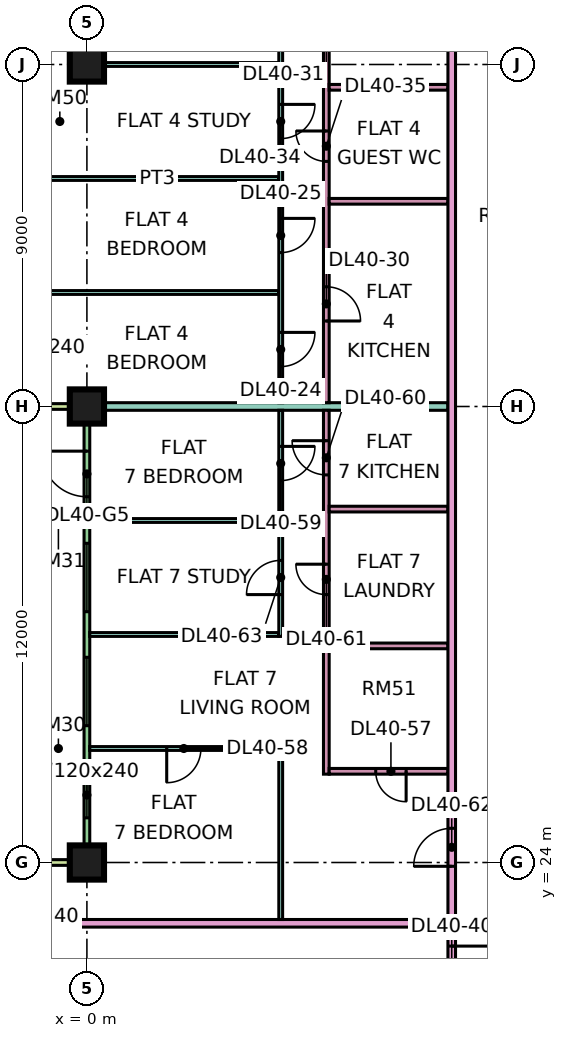
"""IFC4 building model, lengths in metres.
Left out: names, types, materials, properties, quantities, classifications, styles, units other than length and angle.
Written with IfcOpenShell. Run it as: python <this file> out.ifc"""

import sys

from ifc_helpers import new_model, si_unit, direction, frame, frame_2d, origin, origin_2d, place, context, subcontext, project, spatial, rectangle, extrude, element, fill, save


model = new_model("IFC4")
c1 = context("Model", 3, precision=1e-05, world=origin(), true_north=direction((0.0, 1.0)))
c2 = subcontext(c1, "Body", "Model", "MODEL_VIEW")
j1 = project(units=[si_unit("LENGTHUNIT", "METRE"), si_unit("PLANEANGLEUNIT", "RADIAN")], contexts=[c1])
p1 = place(None, origin())
s1 = spatial("IfcSite", under=j1, at=p1, CompositionType="ELEMENT")
p2 = place(p1, origin())
s2 = spatial("IfcBuilding", under=s1, at=p2, CompositionType="ELEMENT")
p3 = place(p2, frame((0.0, 0.0, 176.15)))
s3 = spatial("IfcBuildingStorey", under=s2, at=p3, CompositionType="ELEMENT", Elevation=176.15)
p4 = place(p3, frame((0.0, 24.0, 0.0), z_axis=(0.0, 0.0, 1.0), x_axis=(1.0, 0.0, 0.0)))
e1 = element("IfcColumn", 1, at=p4, inside=s3, PredefinedType="COLUMN", context=c2, shape_type="SweptSolid", body=[
    extrude(rectangle(XDim=0.9, YDim=0.9, at=origin_2d()), origin(), (0.0, 0.0, 1.0), 3.75),
])
p5 = place(p3, frame((0.0, 36.0, 0.0), z_axis=(0.0, 0.0, 1.0), x_axis=(1.0, 0.0, 0.0)))
e2 = element("IfcColumn", 2, at=p5, inside=s3, PredefinedType="COLUMN", context=c2, shape_type="SweptSolid", body=[
    extrude(rectangle(XDim=0.9, YDim=0.9, at=origin_2d()), origin(), (0.0, 0.0, 1.0), 3.75),
])
p6 = place(p3, frame((0.0, 45.0, 0.0), z_axis=(0.0, 0.0, 1.0), x_axis=(1.0, 0.0, 0.0)))
e3 = element("IfcColumn", 3, at=p6, inside=s3, PredefinedType="COLUMN", context=c2, shape_type="SweptSolid", body=[
    extrude(rectangle(XDim=0.9, YDim=0.9, at=origin_2d()), origin(), (0.0, 0.0, 1.0), 3.75),
])
p7 = place(p3, frame((0.0, 35.925, 0.0), z_axis=(0.0, 0.0, 1.0), x_axis=(0.0, -1.0, 0.0)))
e4 = element("IfcWall", 4, at=p7, inside=s3, PredefinedType="SOLIDWALL", context=c2, shape_type="SweptSolid", body=[
    extrude(rectangle(XDim=11.85, YDim=0.15, at=frame_2d((5.925, 0.0))), origin(), (0.0, 0.0, 1.0), 3.35),
])
p8 = place(p7, frame((1.1, 0.0, 0.0)))
e5 = element("IfcOpeningElement", 5, at=p8, cuts=e4, PredefinedType="OPENING", context=c2, shape_type="SweptSolid", body=[
    extrude(rectangle(XDim=1.2, YDim=2.4, at=frame_2d((0.6, 1.2))), frame((0.0, 0.085, 0.0), z_axis=(0.0, -1.0, 0.0), x_axis=(1.0, 0.0, 0.0)), (0.0, 0.0, 1.0), 0.17),
])
p9 = place(p7, frame((3.525, 0.0, 0.45)))
e6 = element("IfcOpeningElement", 6, at=p9, cuts=e4, PredefinedType="OPENING", context=c2, shape_type="SweptSolid", body=[
    extrude(rectangle(XDim=1.8, YDim=2.4, at=frame_2d((0.9, 1.2))), frame((0.0, 0.085, 0.0), z_axis=(0.0, -1.0, 0.0), x_axis=(1.0, 0.0, 0.0)), (0.0, 0.0, 1.0), 0.17),
])
p10 = place(p7, frame((6.525, 0.0, 0.45)))
e7 = element("IfcOpeningElement", 7, at=p10, cuts=e4, PredefinedType="OPENING", context=c2, shape_type="SweptSolid", body=[
    extrude(rectangle(XDim=1.8, YDim=2.4, at=frame_2d((0.9, 1.2))), frame((0.0, 0.085, 0.0), z_axis=(0.0, -1.0, 0.0), x_axis=(1.0, 0.0, 0.0)), (0.0, 0.0, 1.0), 0.17),
])
p11 = place(p7, frame((9.55, 0.0, 0.45)))
e8 = element("IfcOpeningElement", 8, at=p11, cuts=e4, PredefinedType="OPENING", context=c2, shape_type="SweptSolid", body=[
    extrude(rectangle(XDim=1.2, YDim=2.4, at=frame_2d((0.6, 1.2))), frame((0.0, 0.085, 0.0), z_axis=(0.0, -1.0, 0.0), x_axis=(1.0, 0.0, 0.0)), (0.0, 0.0, 1.0), 0.17),
])
for number, where, z_axis, x_axis in (
    (9, (-1.5, 36.0, 0.0), (0.0, 0.0, 1.0), (1.0, 0.0, 0.0)),
    (10, (-1.5, 24.0, 0.0), (0.0, 0.0, 1.0), (1.0, 0.0, 0.0)),
):
    element("IfcWall", number, at=place(p3, frame(where, z_axis=z_axis, x_axis=x_axis)), inside=s3, PredefinedType="SOLIDWALL", context=c2, shape_type="SweptSolid", body=[
        extrude(rectangle(XDim=1.5, YDim=0.15, at=frame_2d((0.75, 0.0))), origin(), (0.0, 0.0, 1.0), 3.35),
    ])
p12 = place(p3, frame((-1.351, 39.0, 0.0), z_axis=(0.0, 0.0, 1.0), x_axis=(1.0, 0.0, 0.0)))
e11 = element("IfcWall", 11, at=p12, inside=s3, PredefinedType="PARTITIONING", context=c2, shape_type="SweptSolid", body=[
    extrude(rectangle(XDim=6.401, YDim=0.1, at=frame_2d((3.201, 0.0))), origin(), (0.0, 0.0, 1.0), 3.35),
])
p13 = place(p3, frame((-1.35, 22.4, 0.0), z_axis=(0.0, 0.0, 1.0), x_axis=(1.0, 0.0, 0.0)))
e12 = element("IfcWall", 12, at=p13, inside=s3, PredefinedType="PARTITIONING", context=c2, shape_type="SweptSolid", body=[
    extrude(rectangle(XDim=10.85, YDim=0.2, at=frame_2d((5.425, 0.0))), origin(), (0.0, 0.0, 1.0), 3.35),
])
e13 = element("IfcWall", 13, at=p5, inside=s3, PredefinedType="PARTITIONING", context=c2, shape_type="SweptSolid", body=[
    extrude(rectangle(XDim=9.5, YDim=0.2, at=frame_2d((4.75, 0.0))), origin(), (0.0, 0.0, 1.0), 3.35),
])
p14 = place(p3, frame((-1.35, 42.0, 0.0), z_axis=(0.0, 0.0, 1.0), x_axis=(1.0, 0.0, 0.0)))
e14 = element("IfcWall", 14, at=p14, inside=s3, PredefinedType="PARTITIONING", context=c2, shape_type="SweptSolid", body=[
    extrude(rectangle(XDim=6.4, YDim=0.1, at=frame_2d((3.2, 0.0))), origin(), (0.0, 0.0, 1.0), 3.35),
])
e15 = element("IfcWall", 15, at=p6, inside=s3, PredefinedType="PARTITIONING", context=c2, shape_type="SweptSolid", body=[
    extrude(rectangle(XDim=5.05, YDim=0.1, at=frame_2d((2.525, 0.0))), origin(), (0.0, 0.0, 1.0), 3.35),
])
p15 = place(p3, frame((0.074, 27.0, 0.0), z_axis=(0.0, 0.0, 1.0), x_axis=(1.0, 0.0, 0.0)))
e16 = element("IfcWall", 16, at=p15, inside=s3, PredefinedType="PARTITIONING", context=c2, shape_type="SweptSolid", body=[
    extrude(rectangle(XDim=5.076, YDim=0.1, at=frame_2d((2.538, 0.0))), origin(), (0.0, 0.0, 1.0), 3.35),
])
p16 = place(p15, frame((2.026, 0.0, 0.0)))
e17 = element("IfcOpeningElement", 17, at=p16, cuts=e16, PredefinedType="OPENING", context=c2, shape_type="SweptSolid", body=[
    extrude(rectangle(XDim=0.9, YDim=2.1, at=frame_2d((0.45, 1.05))), frame((0.0, 0.06, 0.0), z_axis=(0.0, -1.0, 0.0), x_axis=(1.0, 0.0, 0.0)), (0.0, 0.0, 1.0), 0.12),
])
for number, where, z_axis, x_axis in (
    (18, (0.074, 30.0, 0.0), (0.0, 0.0, 1.0), (1.0, 0.0, 0.0)),
    (19, (0.074, 33.0, 0.0), (0.0, 0.0, 1.0), (1.0, 0.0, 0.0)),
):
    element("IfcWall", number, at=place(p3, frame(where, z_axis=z_axis, x_axis=x_axis)), inside=s3, PredefinedType="PARTITIONING", context=c2, shape_type="SweptSolid", body=[
        extrude(rectangle(XDim=4.976, YDim=0.1, at=frame_2d((2.488, 0.0))), origin(), (0.0, 0.0, 1.0), 3.35),
    ])
p17 = place(p3, frame((5.1, 22.5, 0.0), z_axis=(0.0, 0.0, 1.0), x_axis=(0.0, 1.0, 0.0)))
e20 = element("IfcWall", 20, at=p17, inside=s3, PredefinedType="PARTITIONING", context=c2, shape_type="SweptSolid", body=[
    extrude(rectangle(XDim=4.45, YDim=0.1, at=frame_2d((2.225, 0.0))), origin(), (0.0, 0.0, 1.0), 3.35),
])
p18 = place(p3, frame((5.1, 29.95, 0.0), z_axis=(0.0, 0.0, 1.0), x_axis=(0.0, 1.0, 0.0)))
e21 = element("IfcWall", 21, at=p18, inside=s3, PredefinedType="PARTITIONING", context=c2, shape_type="SweptSolid", body=[
    extrude(rectangle(XDim=5.95, YDim=0.1, at=frame_2d((2.975, 0.0))), origin(), (0.0, 0.0, 1.0), 3.35),
])
p19 = place(p18, frame((4.1, 0.0, 0.0)))
e22 = element("IfcOpeningElement", 22, at=p19, cuts=e21, PredefinedType="OPENING", context=c2, shape_type="SweptSolid", body=[
    extrude(rectangle(XDim=0.9, YDim=2.1, at=frame_2d((0.45, 1.05))), frame((0.0, 0.06, 0.0), z_axis=(0.0, -1.0, 0.0), x_axis=(1.0, 0.0, 0.0)), (0.0, 0.0, 1.0), 0.12),
])
p20 = place(p18, frame((1.1, 0.0, 0.0)))
e23 = element("IfcOpeningElement", 23, at=p20, cuts=e21, PredefinedType="OPENING", context=c2, shape_type="SweptSolid", body=[
    extrude(rectangle(XDim=0.9, YDim=2.1, at=frame_2d((0.45, 1.05))), frame((0.0, 0.06, 0.0), z_axis=(0.0, -1.0, 0.0), x_axis=(1.0, 0.0, 0.0)), (0.0, 0.0, 1.0), 0.12),
])
p21 = place(p3, frame((5.1, 36.1, 0.0), z_axis=(0.0, 0.0, 1.0), x_axis=(0.0, 1.0, 0.0)))
e24 = element("IfcWall", 24, at=p21, inside=s3, PredefinedType="PARTITIONING", context=c2, shape_type="SweptSolid", body=[
    extrude(rectangle(XDim=26.826, YDim=0.1, at=frame_2d((13.413, 0.0))), origin(), (0.0, 0.0, 1.0), 3.35),
])
p22 = place(p21, frame((0.95, 0.0, 0.0)))
e25 = element("IfcOpeningElement", 25, at=p22, cuts=e24, PredefinedType="OPENING", context=c2, shape_type="SweptSolid", body=[
    extrude(rectangle(XDim=0.9, YDim=2.1, at=frame_2d((0.45, 1.05))), frame((0.0, 0.06, 0.0), z_axis=(0.0, -1.0, 0.0), x_axis=(1.0, 0.0, 0.0)), (0.0, 0.0, 1.0), 0.12),
])
p23 = place(p21, frame((3.95, 0.0, 0.0)))
e26 = element("IfcOpeningElement", 26, at=p23, cuts=e24, PredefinedType="OPENING", context=c2, shape_type="SweptSolid", body=[
    extrude(rectangle(XDim=0.9, YDim=2.1, at=frame_2d((0.45, 1.05))), frame((0.0, 0.06, 0.0), z_axis=(0.0, -1.0, 0.0), x_axis=(1.0, 0.0, 0.0)), (0.0, 0.0, 1.0), 0.12),
])
p24 = place(p21, frame((9.95, 0.0, 0.0)))
e27 = element("IfcOpeningElement", 27, at=p24, cuts=e24, PredefinedType="OPENING", context=c2, shape_type="SweptSolid", body=[
    extrude(rectangle(XDim=0.9, YDim=2.1, at=frame_2d((0.45, 1.05))), frame((0.0, 0.06, 0.0), z_axis=(0.0, -1.0, 0.0), x_axis=(1.0, 0.0, 0.0)), (0.0, 0.0, 1.0), 0.12),
])
p25 = place(p21, frame((21.95, 0.0, 0.0)))
e28 = element("IfcOpeningElement", 28, at=p25, cuts=e24, PredefinedType="OPENING", context=c2, shape_type="SweptSolid", body=[
    extrude(rectangle(XDim=0.9, YDim=2.1, at=frame_2d((0.45, 1.05))), frame((0.0, 0.06, 0.0), z_axis=(0.0, -1.0, 0.0), x_axis=(1.0, 0.0, 0.0)), (0.0, 0.0, 1.0), 0.12),
])
p26 = place(p21, frame((24.95, 0.0, 0.0)))
e29 = element("IfcOpeningElement", 29, at=p26, cuts=e24, PredefinedType="OPENING", context=c2, shape_type="SweptSolid", body=[
    extrude(rectangle(XDim=0.9, YDim=2.1, at=frame_2d((0.45, 1.05))), frame((0.0, 0.06, 0.0), z_axis=(0.0, -1.0, 0.0), x_axis=(1.0, 0.0, 0.0)), (0.0, 0.0, 1.0), 0.12),
])
p27 = place(p21, frame((15.95, 0.0, 0.0)))
e30 = element("IfcOpeningElement", 30, at=p27, cuts=e24, PredefinedType="OPENING", context=c2, shape_type="SweptSolid", body=[
    extrude(rectangle(XDim=0.9, YDim=2.1, at=frame_2d((0.45, 1.05))), frame((0.0, 0.06, 0.0), z_axis=(0.0, -1.0, 0.0), x_axis=(1.0, 0.0, 0.0)), (0.0, 0.0, 1.0), 0.12),
])
p28 = place(p21, frame((6.95, 0.0, 0.0)))
e31 = element("IfcOpeningElement", 31, at=p28, cuts=e24, PredefinedType="OPENING", context=c2, shape_type="SweptSolid", body=[
    extrude(rectangle(XDim=0.9, YDim=2.1, at=frame_2d((0.45, 1.05))), frame((0.0, 0.06, 0.0), z_axis=(0.0, -1.0, 0.0), x_axis=(1.0, 0.0, 0.0)), (0.0, 0.0, 1.0), 0.12),
])
p29 = place(p3, frame((6.3, 26.325, 0.0), z_axis=(0.0, 0.0, 1.0), x_axis=(0.0, 1.0, 0.0)))
e32 = element("IfcWall", 32, at=p29, inside=s3, PredefinedType="PARTITIONING", context=c2, shape_type="SweptSolid", body=[
    extrude(rectangle(XDim=9.575, YDim=0.15, at=frame_2d((4.788, 0.0))), origin(), (0.0, 0.0, 1.0), 3.35),
])
p30 = place(p29, frame((7.875, 0.0, 0.0)))
e33 = element("IfcOpeningElement", 33, at=p30, cuts=e32, PredefinedType="OPENING", context=c2, shape_type="SweptSolid", body=[
    extrude(rectangle(XDim=0.9, YDim=2.1, at=frame_2d((0.45, 1.05))), frame((0.0, 0.085, 0.0), z_axis=(0.0, -1.0, 0.0), x_axis=(1.0, 0.0, 0.0)), (0.0, 0.0, 1.0), 0.17),
])
p31 = place(p29, frame((4.725, 0.0, 0.0)))
e34 = element("IfcOpeningElement", 34, at=p31, cuts=e32, PredefinedType="OPENING", context=c2, shape_type="SweptSolid", body=[
    extrude(rectangle(XDim=0.8, YDim=2.1, at=frame_2d((0.4, 1.05))), frame((0.0, 0.085, 0.0), z_axis=(0.0, -1.0, 0.0), x_axis=(1.0, 0.0, 0.0)), (0.0, 0.0, 1.0), 0.17),
])
p32 = place(p3, frame((6.3, 36.1, 0.0), z_axis=(0.0, 0.0, 1.0), x_axis=(0.0, 1.0, 0.0)))
e35 = element("IfcWall", 35, at=p32, inside=s3, PredefinedType="PARTITIONING", context=c2, shape_type="SweptSolid", body=[
    extrude(rectangle(XDim=14.375, YDim=0.15, at=frame_2d((7.188, 0.0))), origin(), (0.0, 0.0, 1.0), 3.35),
])
p33 = place(p32, frame((2.15, 0.0, 0.0)))
e36 = element("IfcOpeningElement", 36, at=p33, cuts=e35, PredefinedType="OPENING", context=c2, shape_type="SweptSolid", body=[
    extrude(rectangle(XDim=0.9, YDim=2.1, at=frame_2d((0.45, 1.05))), frame((0.0, 0.085, 0.0), z_axis=(0.0, -1.0, 0.0), x_axis=(1.0, 0.0, 0.0)), (0.0, 0.0, 1.0), 0.17),
])
p34 = place(p32, frame((9.35, 0.0, 0.0)))
e37 = element("IfcOpeningElement", 37, at=p34, cuts=e35, PredefinedType="OPENING", context=c2, shape_type="SweptSolid", body=[
    extrude(rectangle(XDim=0.8, YDim=2.1, at=frame_2d((0.4, 1.05))), frame((0.0, 0.085, 0.0), z_axis=(0.0, -1.0, 0.0), x_axis=(1.0, 0.0, 0.0)), (0.0, 0.0, 1.0), 0.17),
])
p35 = place(p32, frame((6.35, 0.0, 0.0)))
e38 = element("IfcOpeningElement", 38, at=p35, cuts=e35, PredefinedType="OPENING", context=c2, shape_type="SweptSolid", body=[
    extrude(rectangle(XDim=0.8, YDim=2.1, at=frame_2d((0.4, 1.05))), frame((0.0, 0.085, 0.0), z_axis=(0.0, -1.0, 0.0), x_axis=(1.0, 0.0, 0.0)), (0.0, 0.0, 1.0), 0.17),
])
p36 = place(p32, frame((12.35, 0.0, 0.0)))
e39 = element("IfcOpeningElement", 39, at=p36, cuts=e35, PredefinedType="OPENING", context=c2, shape_type="SweptSolid", body=[
    extrude(rectangle(XDim=0.8, YDim=2.1, at=frame_2d((0.4, 1.05))), frame((0.0, 0.085, 0.0), z_axis=(0.0, -1.0, 0.0), x_axis=(1.0, 0.0, 0.0)), (0.0, 0.0, 1.0), 0.17),
])
p37 = place(p3, frame((6.375, 26.4, 0.0), z_axis=(0.0, 0.0, 1.0), x_axis=(1.0, 0.0, 0.0)))
e40 = element("IfcWall", 40, at=p37, inside=s3, PredefinedType="PARTITIONING", context=c2, shape_type="SweptSolid", body=[
    extrude(rectangle(XDim=3.125, YDim=0.15, at=frame_2d((1.562, 0.0))), origin(), (0.0, 0.0, 1.0), 3.35),
])
p38 = place(p37, frame((1.225, 0.0, 0.0)))
e41 = element("IfcOpeningElement", 41, at=p38, cuts=e40, PredefinedType="OPENING", context=c2, shape_type="SweptSolid", body=[
    extrude(rectangle(XDim=0.8, YDim=2.1, at=frame_2d((0.4, 1.05))), frame((0.0, 0.085, 0.0), z_axis=(0.0, -1.0, 0.0), x_axis=(1.0, 0.0, 0.0)), (0.0, 0.0, 1.0), 0.17),
])
for number, where, z_axis, x_axis in (
    (42, (6.375, 29.7, 0.0), (0.0, 0.0, 1.0), (1.0, 0.0, 0.0)),
    (43, (6.375, 33.3, 0.0), (0.0, 0.0, 1.0), (1.0, 0.0, 0.0)),
    (44, (6.375, 41.4, 0.0), (0.0, 0.0, 1.0), (1.0, 0.0, 0.0)),
    (45, (6.375, 44.4, 0.0), (0.0, 0.0, 1.0), (1.0, 0.0, 0.0)),
):
    element("IfcWall", number, at=place(p3, frame(where, z_axis=z_axis, x_axis=x_axis)), inside=s3, PredefinedType="PARTITIONING", context=c2, shape_type="SweptSolid", body=[
        extrude(rectangle(XDim=3.125, YDim=0.15, at=frame_2d((1.562, 0.0))), origin(), (0.0, 0.0, 1.0), 3.35),
    ])
p39 = place(p3, frame((9.6, 20.0, 0.0), z_axis=(0.0, 0.0, 1.0), x_axis=(0.0, 1.0, 0.0)))
e46 = element("IfcWall", 46, at=p39, inside=s3, PredefinedType="PARTITIONING", context=c2, shape_type="SweptSolid", body=[
    extrude(rectangle(XDim=42.926, YDim=0.2, at=frame_2d((21.463, 0.0))), origin(), (0.0, 0.0, 1.0), 3.35),
])
p40 = place(p39, frame((31.35, 0.0, 0.0)))
e47 = element("IfcOpeningElement", 47, at=p40, cuts=e46, PredefinedType="OPENING", context=c2, shape_type="SweptSolid", body=[
    extrude(rectangle(XDim=1.0, YDim=2.1, at=frame_2d((0.5, 1.05))), frame((0.0, 0.11, 0.0), z_axis=(0.0, -1.0, 0.0), x_axis=(1.0, 0.0, 0.0)), (0.0, 0.0, 1.0), 0.22),
])
p41 = place(p39, frame((0.6, 0.0, 0.0)))
e48 = element("IfcOpeningElement", 48, at=p41, cuts=e46, PredefinedType="OPENING", context=c2, shape_type="SweptSolid", body=[
    extrude(rectangle(XDim=1.2, YDim=2.1, at=frame_2d((0.6, 1.05))), frame((0.0, 0.11, 0.0), z_axis=(0.0, -1.0, 0.0), x_axis=(1.0, 0.0, 0.0)), (0.0, 0.0, 1.0), 0.22),
])
p42 = place(p39, frame((3.9, 0.0, 0.0)))
e49 = element("IfcOpeningElement", 49, at=p42, cuts=e46, PredefinedType="OPENING", context=c2, shape_type="SweptSolid", body=[
    extrude(rectangle(XDim=1.0, YDim=2.1, at=frame_2d((0.5, 1.05))), frame((0.0, 0.11, 0.0), z_axis=(0.0, -1.0, 0.0), x_axis=(1.0, 0.0, 0.0)), (0.0, 0.0, 1.0), 0.22),
])
p43 = place(p8, frame((1.2, 0.0, 0.0), z_axis=(0.0, 0.0, 1.0), x_axis=(-1.0, 0.0, 0.0)))
e50 = element("IfcDoor", 50, at=p43, inside=s3, OperationType="DOUBLE_DOOR_SINGLE_SWING", PredefinedType="DOOR", context=c2, shape_type="SweptSolid", body=[
    extrude(rectangle(XDim=1.2, YDim=2.4, at=frame_2d((0.6, 1.2))), frame((0.0, 0.025, 0.0), z_axis=(0.0, -1.0, 0.0), x_axis=(1.0, 0.0, 0.0)), (0.0, 0.0, 1.0), 0.05),
])
fill(e5, e50)
p44 = place(p9, origin())
e51 = element("IfcWindow", 51, at=p44, inside=s3, PartitioningType="SINGLE_PANEL", PredefinedType="WINDOW", context=c2, shape_type="SweptSolid", body=[
    extrude(rectangle(XDim=1.8, YDim=2.4, at=frame_2d((0.9, 1.2))), frame((0.0, 0.03, 0.0), z_axis=(0.0, -1.0, 0.0), x_axis=(1.0, 0.0, 0.0)), (0.0, 0.0, 1.0), 0.06),
])
fill(e6, e51)
p45 = place(p10, origin())
e52 = element("IfcWindow", 52, at=p45, inside=s3, PartitioningType="SINGLE_PANEL", PredefinedType="WINDOW", context=c2, shape_type="SweptSolid", body=[
    extrude(rectangle(XDim=1.8, YDim=2.4, at=frame_2d((0.9, 1.2))), frame((0.0, 0.03, 0.0), z_axis=(0.0, -1.0, 0.0), x_axis=(1.0, 0.0, 0.0)), (0.0, 0.0, 1.0), 0.06),
])
fill(e7, e52)
p46 = place(p11, origin())
e53 = element("IfcWindow", 53, at=p46, inside=s3, PartitioningType="SINGLE_PANEL", PredefinedType="WINDOW", context=c2, shape_type="SweptSolid", body=[
    extrude(rectangle(XDim=1.2, YDim=2.4, at=frame_2d((0.6, 1.2))), frame((0.0, 0.03, 0.0), z_axis=(0.0, -1.0, 0.0), x_axis=(1.0, 0.0, 0.0)), (0.0, 0.0, 1.0), 0.06),
])
fill(e8, e53)
p47 = place(p22, origin())
e54 = element("IfcDoor", 54, at=p47, inside=s3, OperationType="SINGLE_SWING_RIGHT", PredefinedType="DOOR", context=c2, shape_type="SweptSolid", body=[
    extrude(rectangle(XDim=0.9, YDim=2.1, at=frame_2d((0.45, 1.05))), frame((0.0, 0.025, 0.0), z_axis=(0.0, -1.0, 0.0), x_axis=(1.0, 0.0, 0.0)), (0.0, 0.0, 1.0), 0.05),
])
fill(e25, e54)
p48 = place(p23, origin())
e55 = element("IfcDoor", 55, at=p48, inside=s3, OperationType="SINGLE_SWING_RIGHT", PredefinedType="DOOR", context=c2, shape_type="SweptSolid", body=[
    extrude(rectangle(XDim=0.9, YDim=2.1, at=frame_2d((0.45, 1.05))), frame((0.0, 0.025, 0.0), z_axis=(0.0, -1.0, 0.0), x_axis=(1.0, 0.0, 0.0)), (0.0, 0.0, 1.0), 0.05),
])
fill(e26, e55)
p49 = place(p33, frame((0.9, 0.0, 0.0), z_axis=(0.0, 0.0, 1.0), x_axis=(-1.0, 0.0, 0.0)))
e56 = element("IfcDoor", 56, at=p49, inside=s3, OperationType="SINGLE_SWING_LEFT", PredefinedType="DOOR", context=c2, shape_type="SweptSolid", body=[
    extrude(rectangle(XDim=0.9, YDim=2.1, at=frame_2d((0.45, 1.05))), frame((0.0, 0.025, 0.0), z_axis=(0.0, -1.0, 0.0), x_axis=(1.0, 0.0, 0.0)), (0.0, 0.0, 1.0), 0.05),
])
fill(e36, e56)
p50 = place(p28, origin())
e57 = element("IfcDoor", 57, at=p50, inside=s3, OperationType="SINGLE_SWING_RIGHT", PredefinedType="DOOR", context=c2, shape_type="SweptSolid", body=[
    extrude(rectangle(XDim=0.9, YDim=2.1, at=frame_2d((0.45, 1.05))), frame((0.0, 0.025, 0.0), z_axis=(0.0, -1.0, 0.0), x_axis=(1.0, 0.0, 0.0)), (0.0, 0.0, 1.0), 0.05),
])
fill(e31, e57)
p51 = place(p35, frame((0.8, 0.0, 0.0), z_axis=(0.0, 0.0, 1.0), x_axis=(-1.0, 0.0, 0.0)))
e58 = element("IfcDoor", 58, at=p51, inside=s3, OperationType="SINGLE_SWING_RIGHT", PredefinedType="DOOR", context=c2, shape_type="SweptSolid", body=[
    extrude(rectangle(XDim=0.8, YDim=2.1, at=frame_2d((0.4, 1.05))), frame((0.0, 0.025, 0.0), z_axis=(0.0, -1.0, 0.0), x_axis=(1.0, 0.0, 0.0)), (0.0, 0.0, 1.0), 0.05),
])
fill(e38, e58)
p52 = place(p41, origin())
e59 = element("IfcDoor", 59, at=p52, inside=s3, OperationType="SINGLE_SWING_RIGHT", PredefinedType="DOOR", context=c2, shape_type="SweptSolid", body=[
    extrude(rectangle(XDim=1.2, YDim=2.1, at=frame_2d((0.6, 1.05))), frame((0.0, 0.025, 0.0), z_axis=(0.0, -1.0, 0.0), x_axis=(1.0, 0.0, 0.0)), (0.0, 0.0, 1.0), 0.05),
])
fill(e48, e59)
p53 = place(p38, origin())
e60 = element("IfcDoor", 60, at=p53, inside=s3, OperationType="SINGLE_SWING_RIGHT", PredefinedType="DOOR", context=c2, shape_type="SweptSolid", body=[
    extrude(rectangle(XDim=0.8, YDim=2.1, at=frame_2d((0.4, 1.05))), frame((0.0, 0.025, 0.0), z_axis=(0.0, -1.0, 0.0), x_axis=(1.0, 0.0, 0.0)), (0.0, 0.0, 1.0), 0.05),
])
fill(e41, e60)
p54 = place(p16, frame((0.9, 0.0, 0.0), z_axis=(0.0, 0.0, 1.0), x_axis=(-1.0, 0.0, 0.0)))
e61 = element("IfcDoor", 61, at=p54, inside=s3, OperationType="SINGLE_SWING_LEFT", PredefinedType="DOOR", context=c2, shape_type="SweptSolid", body=[
    extrude(rectangle(XDim=0.9, YDim=2.1, at=frame_2d((0.45, 1.05))), frame((0.0, 0.025, 0.0), z_axis=(0.0, -1.0, 0.0), x_axis=(1.0, 0.0, 0.0)), (0.0, 0.0, 1.0), 0.05),
])
fill(e17, e61)
p55 = place(p19, origin())
e62 = element("IfcDoor", 62, at=p55, inside=s3, OperationType="SINGLE_SWING_RIGHT", PredefinedType="DOOR", context=c2, shape_type="SweptSolid", body=[
    extrude(rectangle(XDim=0.9, YDim=2.1, at=frame_2d((0.45, 1.05))), frame((0.0, 0.025, 0.0), z_axis=(0.0, -1.0, 0.0), x_axis=(1.0, 0.0, 0.0)), (0.0, 0.0, 1.0), 0.05),
])
fill(e22, e62)
p56 = place(p30, frame((0.9, 0.0, 0.0), z_axis=(0.0, 0.0, 1.0), x_axis=(-1.0, 0.0, 0.0)))
e63 = element("IfcDoor", 63, at=p56, inside=s3, OperationType="SINGLE_SWING_RIGHT", PredefinedType="DOOR", context=c2, shape_type="SweptSolid", body=[
    extrude(rectangle(XDim=0.9, YDim=2.1, at=frame_2d((0.45, 1.05))), frame((0.0, 0.025, 0.0), z_axis=(0.0, -1.0, 0.0), x_axis=(1.0, 0.0, 0.0)), (0.0, 0.0, 1.0), 0.05),
])
fill(e33, e63)
p57 = place(p31, frame((0.8, 0.0, 0.0), z_axis=(0.0, 0.0, 1.0), x_axis=(-1.0, 0.0, 0.0)))
e64 = element("IfcDoor", 64, at=p57, inside=s3, OperationType="SINGLE_SWING_RIGHT", PredefinedType="DOOR", context=c2, shape_type="SweptSolid", body=[
    extrude(rectangle(XDim=0.8, YDim=2.1, at=frame_2d((0.4, 1.05))), frame((0.0, 0.025, 0.0), z_axis=(0.0, -1.0, 0.0), x_axis=(1.0, 0.0, 0.0)), (0.0, 0.0, 1.0), 0.05),
])
fill(e34, e64)
p58 = place(p42, origin())
e65 = element("IfcDoor", 65, at=p58, inside=s3, OperationType="SINGLE_SWING_LEFT", PredefinedType="DOOR", context=c2, shape_type="SweptSolid", body=[
    extrude(rectangle(XDim=1.0, YDim=2.1, at=frame_2d((0.5, 1.05))), frame((0.0, 0.025, 0.0), z_axis=(0.0, -1.0, 0.0), x_axis=(1.0, 0.0, 0.0)), (0.0, 0.0, 1.0), 0.05),
])
fill(e49, e65)
p59 = place(p20, origin())
e66 = element("IfcDoor", 66, at=p59, inside=s3, OperationType="SINGLE_SWING_LEFT", PredefinedType="DOOR", context=c2, shape_type="SweptSolid", body=[
    extrude(rectangle(XDim=0.9, YDim=2.1, at=frame_2d((0.45, 1.05))), frame((0.0, 0.025, 0.0), z_axis=(0.0, -1.0, 0.0), x_axis=(1.0, 0.0, 0.0)), (0.0, 0.0, 1.0), 0.05),
])
fill(e23, e66)
save(model, sys.argv[1])
